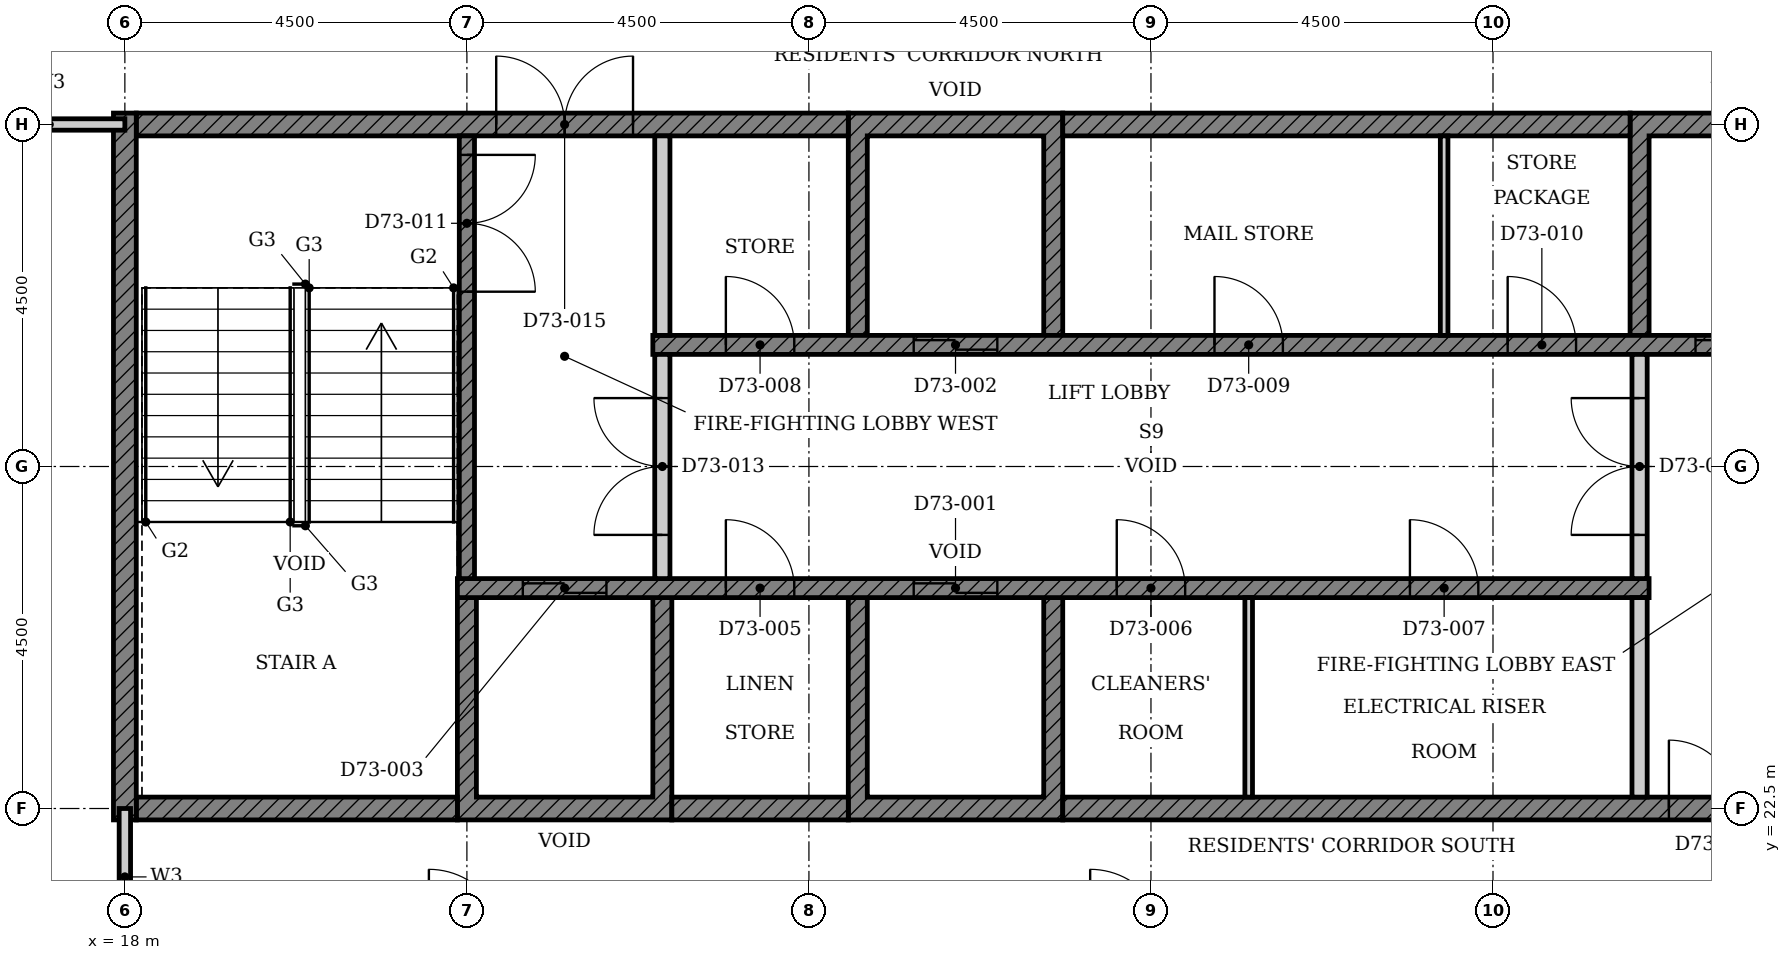
"""IFC4 building model, lengths in metres.
Left out: names, types, materials, properties, quantities, classifications, styles, units other than length and angle.
Written with IfcOpenShell. Run it as: python <this file> out.ifc"""

import sys

from ifc_helpers import new_model, si_unit, direction, frame, frame_2d, origin, place, context, subcontext, project, spatial, polyline, rectangle, outline, extrude, element, fill, save


model = new_model("IFC4")
c1 = context("Model", 3, precision=1e-05, world=origin(), true_north=direction((0.0, 1.0)))
c2 = subcontext(c1, "Body", "Model", "MODEL_VIEW")
j1 = project(units=[si_unit("LENGTHUNIT", "METRE"), si_unit("PLANEANGLEUNIT", "RADIAN")], contexts=[c1])
p1 = place(None, origin())
s1 = spatial("IfcSite", under=j1, at=p1, CompositionType="ELEMENT")
p2 = place(p1, origin())
s2 = spatial("IfcBuilding", under=s1, at=p2, CompositionType="ELEMENT")
p3 = place(p2, frame((0.0, 0.0, 287.1)))
s3 = spatial("IfcBuildingStorey", under=s2, at=p3, CompositionType="ELEMENT", Elevation=287.1)
p4 = place(p3, origin())
e1 = element("IfcWall", 1, at=p4, inside=s3, PredefinedType="SHEAR", context=c2, shape_type="SweptSolid", body=[
    extrude(outline(polyline([(22.375, 22.35), (25.197, 22.35), (25.197, 25.275), (24.947, 25.275), (24.947, 22.65), (22.625, 22.65), (22.625, 25.275), (22.375, 25.275), (22.375, 22.35)])), origin(), (0.0, 0.0, 1.0), 3.4),
])
p5 = place(p3, origin())
e2 = element("IfcWall", 2, at=p5, inside=s3, PredefinedType="SHEAR", context=c2, shape_type="SweptSolid", body=[
    extrude(outline(polyline([(27.518, 22.35), (30.339, 22.35), (30.339, 25.275), (30.089, 25.275), (30.089, 22.65), (27.768, 22.65), (27.768, 25.275), (27.518, 25.275), (27.518, 22.35)])), origin(), (0.0, 0.0, 1.0), 3.4),
])
p6 = place(p3, origin())
e3 = element("IfcWall", 3, at=p6, inside=s3, PredefinedType="SHEAR", context=c2, shape_type="SweptSolid", body=[
    extrude(outline(polyline([(27.518, 28.725), (27.768, 28.725), (27.768, 31.35), (30.089, 31.35), (30.089, 28.725), (30.339, 28.725), (30.339, 31.65), (27.518, 31.65), (27.518, 28.725)])), origin(), (0.0, 0.0, 1.0), 3.4),
])
p7 = place(p3, origin())
e4 = element("IfcWall", 4, at=p7, inside=s3, PredefinedType="SHEAR", context=c2, shape_type="SweptSolid", body=[
    extrude(outline(polyline([(37.803, 28.725), (38.053, 28.725), (38.053, 31.35), (40.375, 31.35), (40.375, 28.725), (40.625, 28.725), (40.625, 31.65), (37.803, 31.65), (37.803, 28.725)])), origin(), (0.0, 0.0, 1.0), 3.4),
])
p8 = place(p3, frame((18.15, 22.5, 0.0), z_axis=(0.0, 0.0, 1.0), x_axis=(1.0, 0.0, 0.0)))
e5 = element("IfcWall", 5, at=p8, inside=s3, PredefinedType="SHEAR", context=c2, shape_type="SweptSolid", body=[
    extrude(rectangle(XDim=4.225, YDim=0.3, at=frame_2d((2.113, 0.0))), origin(), (0.0, 0.0, 1.0), 3.4),
])
p9 = place(p3, frame((25.197, 22.5, 0.0), z_axis=(0.0, 0.0, 1.0), x_axis=(1.0, 0.0, 0.0)))
e6 = element("IfcWall", 6, at=p9, inside=s3, PredefinedType="SHEAR", context=c2, shape_type="SweptSolid", body=[
    extrude(rectangle(XDim=2.321, YDim=0.3, at=frame_2d((1.161, 0.0))), origin(), (0.0, 0.0, 1.0), 3.4),
])
p10 = place(p3, frame((30.339, 22.5, 0.0), z_axis=(0.0, 0.0, 1.0), x_axis=(1.0, 0.0, 0.0)))
e7 = element("IfcWall", 7, at=p10, inside=s3, PredefinedType="SHEAR", context=c2, shape_type="SweptSolid", body=[
    extrude(rectangle(XDim=14.511, YDim=0.3, at=frame_2d((7.255, 0.0))), origin(), (0.0, 0.0, 1.0), 3.4),
])
p11 = place(p10, frame((7.975, 0.0, 0.0)))
e8 = element("IfcOpeningElement", 8, at=p11, cuts=e7, PredefinedType="OPENING", context=c2, shape_type="SweptSolid", body=[
    extrude(rectangle(XDim=1.8, YDim=2.1, at=frame_2d((0.9, 1.05))), frame((0.0, 0.16, 0.0), z_axis=(0.0, -1.0, 0.0), x_axis=(1.0, 0.0, 0.0)), (0.0, 0.0, 1.0), 0.32),
])
p12 = place(p3, frame((18.15, 31.5, 0.0), z_axis=(0.0, 0.0, 1.0), x_axis=(1.0, 0.0, 0.0)))
e9 = element("IfcWall", 9, at=p12, inside=s3, PredefinedType="SHEAR", context=c2, shape_type="SweptSolid", body=[
    extrude(rectangle(XDim=9.368, YDim=0.3, at=frame_2d((4.684, 0.0))), origin(), (0.0, 0.0, 1.0), 3.4),
])
p13 = place(p12, frame((4.736, 0.0, 0.0)))
e10 = element("IfcOpeningElement", 10, at=p13, cuts=e9, PredefinedType="OPENING", context=c2, shape_type="SweptSolid", body=[
    extrude(rectangle(XDim=1.8, YDim=2.1, at=frame_2d((0.9, 1.05))), frame((0.0, 0.16, 0.0), z_axis=(0.0, -1.0, 0.0), x_axis=(1.0, 0.0, 0.0)), (0.0, 0.0, 1.0), 0.32),
])
p14 = place(p3, frame((30.339, 31.5, 0.0), z_axis=(0.0, 0.0, 1.0), x_axis=(1.0, 0.0, 0.0)))
e11 = element("IfcWall", 11, at=p14, inside=s3, PredefinedType="SHEAR", context=c2, shape_type="SweptSolid", body=[
    extrude(rectangle(XDim=7.464, YDim=0.3, at=frame_2d((3.732, 0.0))), origin(), (0.0, 0.0, 1.0), 3.4),
])
p15 = place(p3, frame((18.0, 22.35, 0.0), z_axis=(0.0, 0.0, 1.0), x_axis=(0.0, 1.0, 0.0)))
e12 = element("IfcWall", 12, at=p15, inside=s3, PredefinedType="SHEAR", context=c2, shape_type="SweptSolid", body=[
    extrude(rectangle(XDim=9.3, YDim=0.3, at=frame_2d((4.65, 0.0))), origin(), (0.0, 0.0, 1.0), 3.4),
])
p16 = place(p3, frame((22.375, 25.4, 0.0), z_axis=(0.0, 0.0, 1.0), x_axis=(1.0, 0.0, 0.0)))
e13 = element("IfcWall", 13, at=p16, inside=s3, PredefinedType="SHEAR", context=c2, shape_type="SweptSolid", body=[
    extrude(rectangle(XDim=15.678, YDim=0.25, at=frame_2d((7.839, 0.0))), origin(), (0.0, 0.0, 1.0), 3.4),
])
p17 = place(p16, frame((6.004, 0.0, 0.0)))
e14 = element("IfcOpeningElement", 14, at=p17, cuts=e13, PredefinedType="OPENING", context=c2, shape_type="SweptSolid", body=[
    extrude(rectangle(XDim=1.1, YDim=2.1, at=frame_2d((0.55, 1.05))), frame((0.0, 0.135, 0.0), z_axis=(0.0, -1.0, 0.0), x_axis=(1.0, 0.0, 0.0)), (0.0, 0.0, 1.0), 0.27),
])
p18 = place(p16, frame((0.861, 0.0, 0.0)))
e15 = element("IfcOpeningElement", 15, at=p18, cuts=e13, PredefinedType="OPENING", context=c2, shape_type="SweptSolid", body=[
    extrude(rectangle(XDim=1.1, YDim=2.1, at=frame_2d((0.55, 1.05))), frame((0.0, 0.135, 0.0), z_axis=(0.0, -1.0, 0.0), x_axis=(1.0, 0.0, 0.0)), (0.0, 0.0, 1.0), 0.27),
])
p19 = place(p16, frame((3.532, 0.0, 0.0)))
e16 = element("IfcOpeningElement", 16, at=p19, cuts=e13, PredefinedType="OPENING", context=c2, shape_type="SweptSolid", body=[
    extrude(rectangle(XDim=0.9, YDim=2.1, at=frame_2d((0.45, 1.05))), frame((0.0, 0.135, 0.0), z_axis=(0.0, -1.0, 0.0), x_axis=(1.0, 0.0, 0.0)), (0.0, 0.0, 1.0), 0.27),
])
p20 = place(p16, frame((8.675, 0.0, 0.0)))
e17 = element("IfcOpeningElement", 17, at=p20, cuts=e13, PredefinedType="OPENING", context=c2, shape_type="SweptSolid", body=[
    extrude(rectangle(XDim=0.9, YDim=2.1, at=frame_2d((0.45, 1.05))), frame((0.0, 0.135, 0.0), z_axis=(0.0, -1.0, 0.0), x_axis=(1.0, 0.0, 0.0)), (0.0, 0.0, 1.0), 0.27),
])
p21 = place(p16, frame((12.532, 0.0, 0.0)))
e18 = element("IfcOpeningElement", 18, at=p21, cuts=e13, PredefinedType="OPENING", context=c2, shape_type="SweptSolid", body=[
    extrude(rectangle(XDim=0.9, YDim=2.1, at=frame_2d((0.45, 1.05))), frame((0.0, 0.135, 0.0), z_axis=(0.0, -1.0, 0.0), x_axis=(1.0, 0.0, 0.0)), (0.0, 0.0, 1.0), 0.27),
])
p22 = place(p3, frame((24.947, 28.6, 0.0), z_axis=(0.0, 0.0, 1.0), x_axis=(1.0, 0.0, 0.0)))
e19 = element("IfcWall", 19, at=p22, inside=s3, PredefinedType="SHEAR", context=c2, shape_type="SweptSolid", body=[
    extrude(rectangle(XDim=15.678, YDim=0.25, at=frame_2d((7.839, 0.0))), origin(), (0.0, 0.0, 1.0), 3.4),
])
p23 = place(p22, frame((3.432, 0.0, 0.0)))
e20 = element("IfcOpeningElement", 20, at=p23, cuts=e19, PredefinedType="OPENING", context=c2, shape_type="SweptSolid", body=[
    extrude(rectangle(XDim=1.1, YDim=2.1, at=frame_2d((0.55, 1.05))), frame((0.0, 0.135, 0.0), z_axis=(0.0, -1.0, 0.0), x_axis=(1.0, 0.0, 0.0)), (0.0, 0.0, 1.0), 0.27),
])
p24 = place(p22, frame((13.718, 0.0, 0.0)))
e21 = element("IfcOpeningElement", 21, at=p24, cuts=e19, PredefinedType="OPENING", context=c2, shape_type="SweptSolid", body=[
    extrude(rectangle(XDim=1.1, YDim=2.1, at=frame_2d((0.55, 1.05))), frame((0.0, 0.135, 0.0), z_axis=(0.0, -1.0, 0.0), x_axis=(1.0, 0.0, 0.0)), (0.0, 0.0, 1.0), 0.27),
])
p25 = place(p22, frame((0.961, 0.0, 0.0)))
e22 = element("IfcOpeningElement", 22, at=p25, cuts=e19, PredefinedType="OPENING", context=c2, shape_type="SweptSolid", body=[
    extrude(rectangle(XDim=0.9, YDim=2.1, at=frame_2d((0.45, 1.05))), frame((0.0, 0.135, 0.0), z_axis=(0.0, -1.0, 0.0), x_axis=(1.0, 0.0, 0.0)), (0.0, 0.0, 1.0), 0.27),
])
p26 = place(p22, frame((7.389, 0.0, 0.0)))
e23 = element("IfcOpeningElement", 23, at=p26, cuts=e19, PredefinedType="OPENING", context=c2, shape_type="SweptSolid", body=[
    extrude(rectangle(XDim=0.9, YDim=2.1, at=frame_2d((0.45, 1.05))), frame((0.0, 0.135, 0.0), z_axis=(0.0, -1.0, 0.0), x_axis=(1.0, 0.0, 0.0)), (0.0, 0.0, 1.0), 0.27),
])
p27 = place(p22, frame((11.246, 0.0, 0.0)))
e24 = element("IfcOpeningElement", 24, at=p27, cuts=e19, PredefinedType="OPENING", context=c2, shape_type="SweptSolid", body=[
    extrude(rectangle(XDim=0.9, YDim=2.1, at=frame_2d((0.45, 1.05))), frame((0.0, 0.135, 0.0), z_axis=(0.0, -1.0, 0.0), x_axis=(1.0, 0.0, 0.0)), (0.0, 0.0, 1.0), 0.27),
])
p28 = place(p3, frame((37.928, 22.65, 0.0), z_axis=(0.0, 0.0, 1.0), x_axis=(0.0, 1.0, 0.0)))
e25 = element("IfcWall", 25, at=p28, inside=s3, PredefinedType="PARTITIONING", context=c2, shape_type="SweptSolid", body=[
    extrude(rectangle(XDim=2.625, YDim=0.2, at=frame_2d((1.312, 0.0))), origin(), (0.0, 0.0, 1.0), 3.4),
])
p29 = place(p3, frame((32.786, 22.65, 0.0), z_axis=(0.0, 0.0, 1.0), x_axis=(0.0, 1.0, 0.0)))
e26 = element("IfcWall", 26, at=p29, inside=s3, PredefinedType="PARTITIONING", context=c2, shape_type="SweptSolid", body=[
    extrude(rectangle(XDim=2.625, YDim=0.1, at=frame_2d((1.312, 0.0))), origin(), (0.0, 0.0, 1.0), 3.4),
])
p30 = place(p3, frame((25.072, 28.725, 0.0), z_axis=(0.0, 0.0, 1.0), x_axis=(0.0, 1.0, 0.0)))
e27 = element("IfcWall", 27, at=p30, inside=s3, PredefinedType="PARTITIONING", context=c2, shape_type="SweptSolid", body=[
    extrude(rectangle(XDim=2.625, YDim=0.2, at=frame_2d((1.312, 0.0))), origin(), (0.0, 0.0, 1.0), 3.4),
])
p31 = place(p3, frame((35.357, 28.725, 0.0), z_axis=(0.0, 0.0, 1.0), x_axis=(0.0, 1.0, 0.0)))
e28 = element("IfcWall", 28, at=p31, inside=s3, PredefinedType="PARTITIONING", context=c2, shape_type="SweptSolid", body=[
    extrude(rectangle(XDim=2.625, YDim=0.1, at=frame_2d((1.312, 0.0))), origin(), (0.0, 0.0, 1.0), 3.4),
])
p32 = place(p3, frame((22.5, 31.35, 0.0), z_axis=(0.0, 0.0, 1.0), x_axis=(0.0, -1.0, 0.0)))
e29 = element("IfcWall", 29, at=p32, inside=s3, PredefinedType="SHEAR", context=c2, shape_type="SweptSolid", body=[
    extrude(rectangle(XDim=5.825, YDim=0.2, at=frame_2d((2.913, 0.0))), origin(), (0.0, 0.0, 1.0), 3.4),
])
p33 = place(p32, frame((0.25, 0.0, 0.0)))
e30 = element("IfcOpeningElement", 30, at=p33, cuts=e29, PredefinedType="OPENING", context=c2, shape_type="SweptSolid", body=[
    extrude(rectangle(XDim=1.8, YDim=2.1, at=frame_2d((0.9, 1.05))), frame((0.0, 0.11, 0.0), z_axis=(0.0, -1.0, 0.0), x_axis=(1.0, 0.0, 0.0)), (0.0, 0.0, 1.0), 0.22),
])
p34 = place(p3, frame((25.072, 25.525, 0.0), z_axis=(0.0, 0.0, 1.0), x_axis=(0.0, 1.0, 0.0)))
e31 = element("IfcWall", 31, at=p34, inside=s3, PredefinedType="PARTITIONING", context=c2, shape_type="SweptSolid", body=[
    extrude(rectangle(XDim=2.95, YDim=0.2, at=frame_2d((1.475, 0.0))), origin(), (0.0, 0.0, 1.0), 3.4),
])
p35 = place(p34, frame((0.575, 0.0, 0.0)))
e32 = element("IfcOpeningElement", 32, at=p35, cuts=e31, PredefinedType="OPENING", context=c2, shape_type="SweptSolid", body=[
    extrude(rectangle(XDim=1.8, YDim=2.1, at=frame_2d((0.9, 1.05))), frame((0.0, 0.11, 0.0), z_axis=(0.0, -1.0, 0.0), x_axis=(1.0, 0.0, 0.0)), (0.0, 0.0, 1.0), 0.22),
])
p36 = place(p3, frame((37.928, 25.525, 0.0), z_axis=(0.0, 0.0, 1.0), x_axis=(0.0, 1.0, 0.0)))
e33 = element("IfcWall", 33, at=p36, inside=s3, PredefinedType="PARTITIONING", context=c2, shape_type="SweptSolid", body=[
    extrude(rectangle(XDim=2.95, YDim=0.2, at=frame_2d((1.475, 0.0))), origin(), (0.0, 0.0, 1.0), 3.4),
])
p37 = place(p36, frame((0.575, 0.0, 0.0)))
e34 = element("IfcOpeningElement", 34, at=p37, cuts=e33, PredefinedType="OPENING", context=c2, shape_type="SweptSolid", body=[
    extrude(rectangle(XDim=1.8, YDim=2.1, at=frame_2d((0.9, 1.05))), frame((0.0, 0.11, 0.0), z_axis=(0.0, -1.0, 0.0), x_axis=(1.0, 0.0, 0.0)), (0.0, 0.0, 1.0), 0.22),
])
p38 = place(p3, frame((13.26, 31.5, 0.0), z_axis=(0.0, 0.0, 1.0), x_axis=(1.0, 0.0, 0.0)))
e35 = element("IfcWall", 35, at=p38, inside=s3, PredefinedType="PARTITIONING", context=c2, shape_type="SweptSolid", body=[
    extrude(rectangle(XDim=4.74, YDim=0.15, at=frame_2d((2.37, 0.0))), origin(), (0.0, 0.0, 1.0), 3.4),
])
p39 = place(p38, frame((1.75, 0.0, 0.0)))
e36 = element("IfcOpeningElement", 36, at=p39, cuts=e35, PredefinedType="OPENING", context=c2, shape_type="SweptSolid", body=[
    extrude(rectangle(XDim=1.0, YDim=2.2, at=frame_2d((0.5, 1.1))), frame((0.0, 0.085, 0.0), z_axis=(0.0, -1.0, 0.0), x_axis=(1.0, 0.0, 0.0)), (0.0, 0.0, 1.0), 0.17),
])
p40 = place(p3, frame((18.0, 20.7, 0.0), z_axis=(0.0, 0.0, 1.0), x_axis=(0.0, 1.0, 0.0)))
e37 = element("IfcWall", 37, at=p40, inside=s3, PredefinedType="PARTITIONING", context=c2, shape_type="SweptSolid", body=[
    extrude(rectangle(XDim=1.8, YDim=0.15, at=frame_2d((0.9, 0.0))), origin(), (0.0, 0.0, 1.0), 3.4),
])
p41 = place(p17, origin())
e38 = element("IfcDoor", 38, at=p41, inside=s3, OperationType="DOUBLE_DOOR_SLIDING", PredefinedType="DOOR", context=c2, shape_type="SweptSolid", body=[
    extrude(rectangle(XDim=1.1, YDim=2.1, at=frame_2d((0.55, 1.05))), frame((0.0, 0.025, 0.0), z_axis=(0.0, -1.0, 0.0), x_axis=(1.0, 0.0, 0.0)), (0.0, 0.0, 1.0), 0.05),
])
fill(e14, e38)
p42 = place(p23, origin())
e39 = element("IfcDoor", 39, at=p42, inside=s3, OperationType="DOUBLE_DOOR_SLIDING", PredefinedType="DOOR", context=c2, shape_type="SweptSolid", body=[
    extrude(rectangle(XDim=1.1, YDim=2.1, at=frame_2d((0.55, 1.05))), frame((0.0, 0.025, 0.0), z_axis=(0.0, -1.0, 0.0), x_axis=(1.0, 0.0, 0.0)), (0.0, 0.0, 1.0), 0.05),
])
fill(e20, e39)
p43 = place(p18, origin())
e40 = element("IfcDoor", 40, at=p43, inside=s3, OperationType="DOUBLE_DOOR_SLIDING", PredefinedType="DOOR", context=c2, shape_type="SweptSolid", body=[
    extrude(rectangle(XDim=1.1, YDim=2.1, at=frame_2d((0.55, 1.05))), frame((0.0, 0.025, 0.0), z_axis=(0.0, -1.0, 0.0), x_axis=(1.0, 0.0, 0.0)), (0.0, 0.0, 1.0), 0.05),
])
fill(e15, e40)
p44 = place(p24, origin())
e41 = element("IfcDoor", 41, at=p44, inside=s3, OperationType="DOUBLE_DOOR_SLIDING", PredefinedType="DOOR", context=c2, shape_type="SweptSolid", body=[
    extrude(rectangle(XDim=1.1, YDim=2.1, at=frame_2d((0.55, 1.05))), frame((0.0, 0.025, 0.0), z_axis=(0.0, -1.0, 0.0), x_axis=(1.0, 0.0, 0.0)), (0.0, 0.0, 1.0), 0.05),
])
fill(e21, e41)
p45 = place(p19, origin())
e42 = element("IfcDoor", 42, at=p45, inside=s3, OperationType="SINGLE_SWING_LEFT", PredefinedType="DOOR", context=c2, shape_type="SweptSolid", body=[
    extrude(rectangle(XDim=0.9, YDim=2.1, at=frame_2d((0.45, 1.05))), frame((0.0, 0.025, 0.0), z_axis=(0.0, -1.0, 0.0), x_axis=(1.0, 0.0, 0.0)), (0.0, 0.0, 1.0), 0.05),
])
fill(e16, e42)
p46 = place(p20, origin())
e43 = element("IfcDoor", 43, at=p46, inside=s3, OperationType="SINGLE_SWING_LEFT", PredefinedType="DOOR", context=c2, shape_type="SweptSolid", body=[
    extrude(rectangle(XDim=0.9, YDim=2.1, at=frame_2d((0.45, 1.05))), frame((0.0, 0.025, 0.0), z_axis=(0.0, -1.0, 0.0), x_axis=(1.0, 0.0, 0.0)), (0.0, 0.0, 1.0), 0.05),
])
fill(e17, e43)
p47 = place(p21, origin())
e44 = element("IfcDoor", 44, at=p47, inside=s3, OperationType="SINGLE_SWING_LEFT", PredefinedType="DOOR", context=c2, shape_type="SweptSolid", body=[
    extrude(rectangle(XDim=0.9, YDim=2.1, at=frame_2d((0.45, 1.05))), frame((0.0, 0.025, 0.0), z_axis=(0.0, -1.0, 0.0), x_axis=(1.0, 0.0, 0.0)), (0.0, 0.0, 1.0), 0.05),
])
fill(e18, e44)
p48 = place(p25, origin())
e45 = element("IfcDoor", 45, at=p48, inside=s3, OperationType="SINGLE_SWING_LEFT", PredefinedType="DOOR", context=c2, shape_type="SweptSolid", body=[
    extrude(rectangle(XDim=0.9, YDim=2.1, at=frame_2d((0.45, 1.05))), frame((0.0, 0.025, 0.0), z_axis=(0.0, -1.0, 0.0), x_axis=(1.0, 0.0, 0.0)), (0.0, 0.0, 1.0), 0.05),
])
fill(e22, e45)
p49 = place(p26, origin())
e46 = element("IfcDoor", 46, at=p49, inside=s3, OperationType="SINGLE_SWING_LEFT", PredefinedType="DOOR", context=c2, shape_type="SweptSolid", body=[
    extrude(rectangle(XDim=0.9, YDim=2.1, at=frame_2d((0.45, 1.05))), frame((0.0, 0.025, 0.0), z_axis=(0.0, -1.0, 0.0), x_axis=(1.0, 0.0, 0.0)), (0.0, 0.0, 1.0), 0.05),
])
fill(e23, e46)
p50 = place(p27, origin())
e47 = element("IfcDoor", 47, at=p50, inside=s3, OperationType="SINGLE_SWING_LEFT", PredefinedType="DOOR", context=c2, shape_type="SweptSolid", body=[
    extrude(rectangle(XDim=0.9, YDim=2.1, at=frame_2d((0.45, 1.05))), frame((0.0, 0.025, 0.0), z_axis=(0.0, -1.0, 0.0), x_axis=(1.0, 0.0, 0.0)), (0.0, 0.0, 1.0), 0.05),
])
fill(e24, e47)
p51 = place(p33, origin())
e48 = element("IfcDoor", 48, at=p51, inside=s3, OperationType="DOUBLE_DOOR_SINGLE_SWING", PredefinedType="DOOR", context=c2, shape_type="SweptSolid", body=[
    extrude(rectangle(XDim=1.8, YDim=2.1, at=frame_2d((0.9, 1.05))), frame((0.0, 0.025, 0.0), z_axis=(0.0, -1.0, 0.0), x_axis=(1.0, 0.0, 0.0)), (0.0, 0.0, 1.0), 0.05),
])
fill(e30, e48)
p52 = place(p35, origin())
e49 = element("IfcDoor", 49, at=p52, inside=s3, OperationType="DOUBLE_DOOR_SINGLE_SWING", PredefinedType="DOOR", context=c2, shape_type="SweptSolid", body=[
    extrude(rectangle(XDim=1.8, YDim=2.1, at=frame_2d((0.9, 1.05))), frame((0.0, 0.025, 0.0), z_axis=(0.0, -1.0, 0.0), x_axis=(1.0, 0.0, 0.0)), (0.0, 0.0, 1.0), 0.05),
])
fill(e32, e49)
p53 = place(p37, origin())
e50 = element("IfcDoor", 50, at=p53, inside=s3, OperationType="DOUBLE_DOOR_SINGLE_SWING", PredefinedType="DOOR", context=c2, shape_type="SweptSolid", body=[
    extrude(rectangle(XDim=1.8, YDim=2.1, at=frame_2d((0.9, 1.05))), frame((0.0, 0.025, 0.0), z_axis=(0.0, -1.0, 0.0), x_axis=(1.0, 0.0, 0.0)), (0.0, 0.0, 1.0), 0.05),
])
fill(e34, e50)
p54 = place(p13, origin())
e51 = element("IfcDoor", 51, at=p54, inside=s3, OperationType="DOUBLE_DOOR_SINGLE_SWING", PredefinedType="DOOR", context=c2, shape_type="SweptSolid", body=[
    extrude(rectangle(XDim=1.8, YDim=2.1, at=frame_2d((0.9, 1.05))), frame((0.0, 0.025, 0.0), z_axis=(0.0, -1.0, 0.0), x_axis=(1.0, 0.0, 0.0)), (0.0, 0.0, 1.0), 0.05),
])
fill(e10, e51)
p55 = place(p11, origin())
e52 = element("IfcDoor", 52, at=p55, inside=s3, OperationType="DOUBLE_DOOR_SINGLE_SWING", PredefinedType="DOOR", context=c2, shape_type="SweptSolid", body=[
    extrude(rectangle(XDim=1.8, YDim=2.1, at=frame_2d((0.9, 1.05))), frame((0.0, 0.025, 0.0), z_axis=(0.0, -1.0, 0.0), x_axis=(1.0, 0.0, 0.0)), (0.0, 0.0, 1.0), 0.05),
])
fill(e8, e52)
save(model, sys.argv[1])
